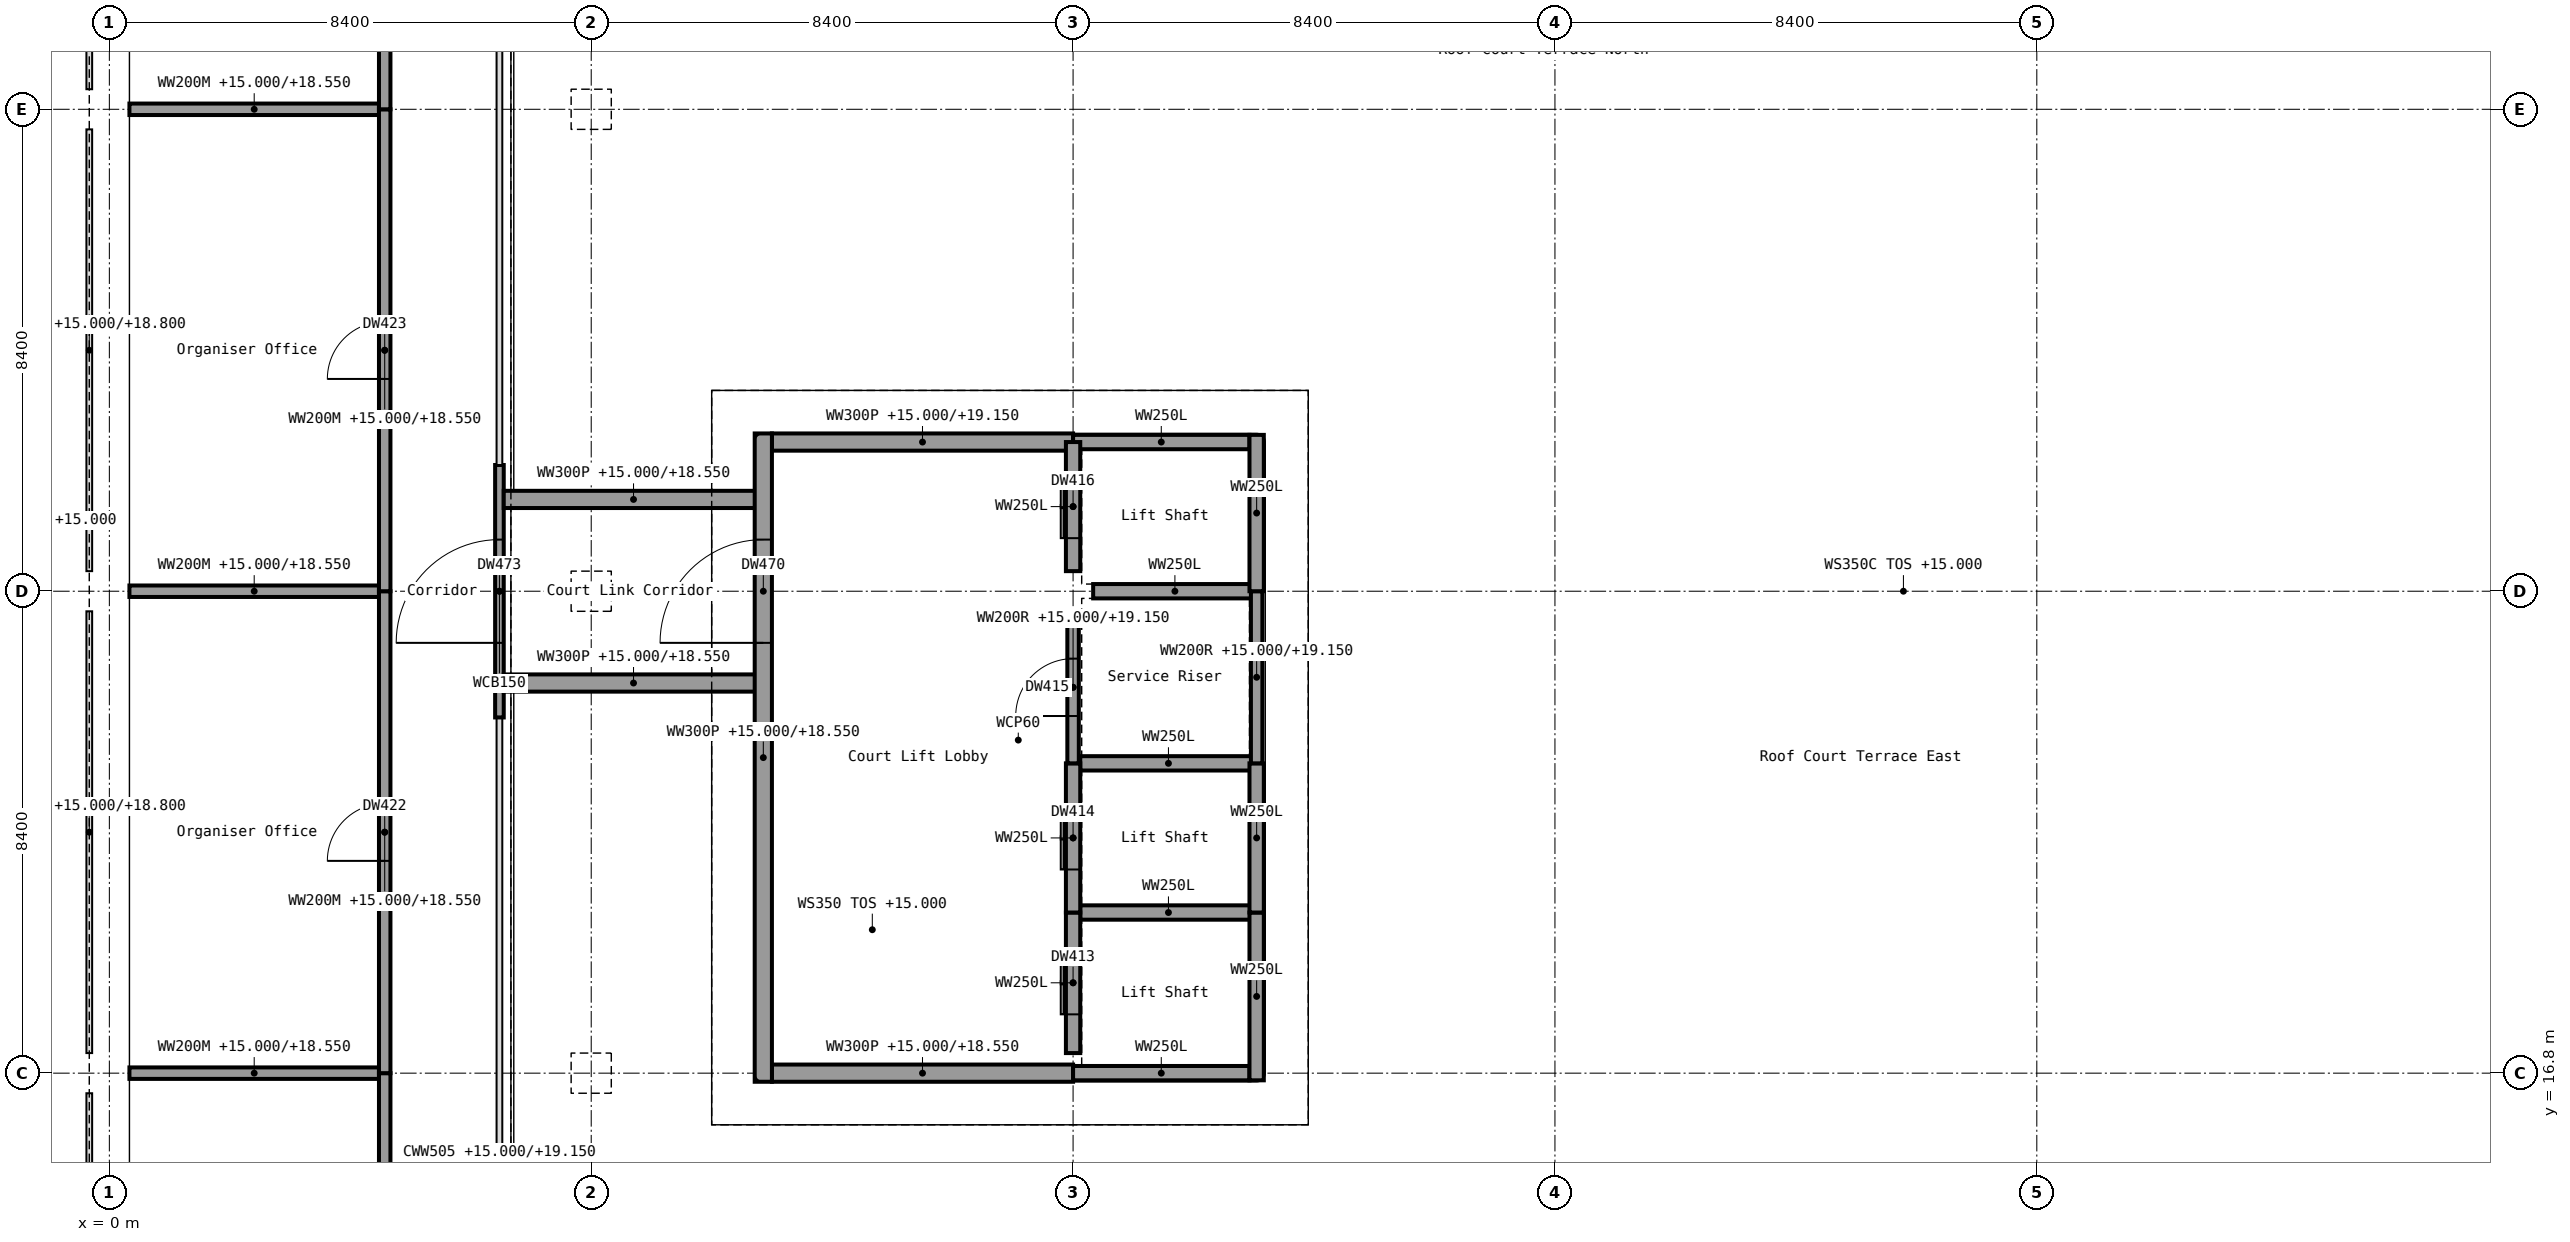
"""IFC4 building model, lengths in metres.
Left out: names, types, materials, properties, quantities, classifications, styles, units other than length and angle.
Written with IfcOpenShell. Run it as: python <this file> out.ifc"""

import sys

from ifc_helpers import new_model, si_unit, direction, frame, frame_2d, origin, origin_2d, place, context, subcontext, project, spatial, rectangle, extrude, element, fill, save


model = new_model("IFC4")
c1 = context("Model", 3, precision=1e-05, world=origin(), true_north=direction((0.0, 1.0)))
c2 = subcontext(c1, "Body", "Model", "MODEL_VIEW")
j1 = project(units=[si_unit("LENGTHUNIT", "METRE"), si_unit("PLANEANGLEUNIT", "RADIAN")], contexts=[c1])
p1 = place(None, origin())
s1 = spatial("IfcSite", under=j1, at=p1, CompositionType="ELEMENT")
p2 = place(p1, origin())
s2 = spatial("IfcBuilding", under=s1, at=p2, CompositionType="ELEMENT")
p3 = place(p2, frame((0.0, 0.0, 15.0)))
s3 = spatial("IfcBuildingStorey", under=s2, at=p3, CompositionType="ELEMENT", Elevation=15.0)
for number, where, z_axis, x_axis in (
    (1, (0.0, 16.8, 0.0), (0.0, 0.0, 1.0), (1.0, 0.0, 0.0)),
    (2, (0.0, 25.2, 0.0), (0.0, 0.0, 1.0), (1.0, 0.0, 0.0)),
    (3, (0.0, 33.6, 0.0), (0.0, 0.0, 1.0), (1.0, 0.0, 0.0)),
    (4, (8.4, 16.8, 0.0), (0.0, 0.0, 1.0), (1.0, 0.0, 0.0)),
    (5, (8.4, 25.2, 0.0), (0.0, 0.0, 1.0), (1.0, 0.0, 0.0)),
    (6, (8.4, 33.6, 0.0), (0.0, 0.0, 1.0), (1.0, 0.0, 0.0)),
):
    element("IfcColumn", number, at=place(p3, frame(where, z_axis=z_axis, x_axis=x_axis)), inside=s3, PredefinedType="COLUMN", context=c2, shape_type="SweptSolid", body=[
        extrude(rectangle(XDim=0.7, YDim=0.7, at=origin_2d()), origin(), (0.0, 0.0, 1.0), 4.5),
    ])
p4 = place(p3, frame((6.8, 23.0, 0.0), z_axis=(0.0, 0.0, 1.0), x_axis=(0.0, 1.0, 0.0)))
e7 = element("IfcWall", 7, at=p4, inside=s3, PredefinedType="SOLIDWALL", context=c2, shape_type="SweptSolid", body=[
    extrude(rectangle(XDim=4.4, YDim=0.15, at=frame_2d((2.2, 0.0))), origin(), (0.0, 0.0, 1.0), 4.15),
])
p5 = place(p4, frame((1.3, 0.0, 0.0)))
e8 = element("IfcOpeningElement", 8, at=p5, cuts=e7, PredefinedType="OPENING", context=c2, shape_type="SweptSolid", body=[
    extrude(rectangle(XDim=1.8, YDim=2.4, at=frame_2d((0.9, 1.2))), frame((0.0, 0.075, 0.0), z_axis=(0.0, -1.0, 0.0), x_axis=(1.0, 0.0, 0.0)), (0.0, 0.0, 1.0), 0.15),
])
p6 = place(p3, frame((0.35, 16.8, 0.0), z_axis=(0.0, 0.0, 1.0), x_axis=(1.0, 0.0, 0.0)))
e9 = element("IfcWall", 9, at=p6, inside=s3, PredefinedType="PARTITIONING", context=c2, shape_type="SweptSolid", body=[
    extrude(rectangle(XDim=4.35, YDim=0.2, at=frame_2d((2.175, 0.0))), origin(), (0.0, 0.0, 1.0), 3.55),
])
p7 = place(p3, frame((11.55, 16.8, 0.0), z_axis=(0.0, 0.0, 1.0), x_axis=(1.0, 0.0, 0.0)))
e10 = element("IfcWall", 10, at=p7, inside=s3, PredefinedType="SOLIDWALL", context=c2, shape_type="SweptSolid", body=[
    extrude(rectangle(XDim=5.25, YDim=0.3, at=frame_2d((2.625, 0.0))), origin(), (0.0, 0.0, 1.0), 3.55),
])
for number, where, z_axis, x_axis in (
    (11, (16.8, 16.8, 0.0), (0.0, 0.0, 1.0), (1.0, 0.0, 0.0)),
    (12, (16.925, 19.6, 0.0), (0.0, 0.0, 1.0), (1.0, 0.0, 0.0)),
    (13, (16.925, 22.2, 0.0), (0.0, 0.0, 1.0), (1.0, 0.0, 0.0)),
):
    element("IfcWall", number, at=place(p3, frame(where, z_axis=z_axis, x_axis=x_axis)), inside=s3, PredefinedType="SHEAR", context=c2, shape_type="SweptSolid", body=[
        extrude(rectangle(XDim=3.075, YDim=0.25, at=frame_2d((1.538, 0.0))), origin(), (0.0, 0.0, 1.0), 4.15),
    ])
p8 = place(p3, frame((6.875, 23.6, 0.0), z_axis=(0.0, 0.0, 1.0), x_axis=(1.0, 0.0, 0.0)))
e14 = element("IfcWall", 14, at=p8, inside=s3, PredefinedType="SOLIDWALL", context=c2, shape_type="SweptSolid", body=[
    extrude(rectangle(XDim=4.525, YDim=0.3, at=frame_2d((2.262, 0.0))), origin(), (0.0, 0.0, 1.0), 3.55),
])
p9 = place(p3, frame((0.35, 25.2, 0.0), z_axis=(0.0, 0.0, 1.0), x_axis=(1.0, 0.0, 0.0)))
e15 = element("IfcWall", 15, at=p9, inside=s3, PredefinedType="PARTITIONING", context=c2, shape_type="SweptSolid", body=[
    extrude(rectangle(XDim=4.35, YDim=0.2, at=frame_2d((2.175, 0.0))), origin(), (0.0, 0.0, 1.0), 3.55),
])
p10 = place(p3, frame((17.15, 25.2, 0.0), z_axis=(0.0, 0.0, 1.0), x_axis=(1.0, 0.0, 0.0)))
e16 = element("IfcWall", 16, at=p10, inside=s3, PredefinedType="SHEAR", context=c2, shape_type="SweptSolid", body=[
    extrude(rectangle(XDim=2.85, YDim=0.25, at=frame_2d((1.425, 0.0))), origin(), (0.0, 0.0, 1.0), 4.15),
])
p11 = place(p3, frame((6.875, 26.8, 0.0), z_axis=(0.0, 0.0, 1.0), x_axis=(1.0, 0.0, 0.0)))
e17 = element("IfcWall", 17, at=p11, inside=s3, PredefinedType="SOLIDWALL", context=c2, shape_type="SweptSolid", body=[
    extrude(rectangle(XDim=4.525, YDim=0.3, at=frame_2d((2.262, 0.0))), origin(), (0.0, 0.0, 1.0), 3.55),
])
p12 = place(p3, frame((11.55, 27.8, 0.0), z_axis=(0.0, 0.0, 1.0), x_axis=(1.0, 0.0, 0.0)))
e18 = element("IfcWall", 18, at=p12, inside=s3, PredefinedType="SOLIDWALL", context=c2, shape_type="SweptSolid", body=[
    extrude(rectangle(XDim=5.25, YDim=0.3, at=frame_2d((2.625, 0.0))), origin(), (0.0, 0.0, 1.0), 4.15),
])
p13 = place(p3, frame((16.8, 27.8, 0.0), z_axis=(0.0, 0.0, 1.0), x_axis=(1.0, 0.0, 0.0)))
e19 = element("IfcWall", 19, at=p13, inside=s3, PredefinedType="SHEAR", context=c2, shape_type="SweptSolid", body=[
    extrude(rectangle(XDim=3.075, YDim=0.25, at=frame_2d((1.538, 0.0))), origin(), (0.0, 0.0, 1.0), 4.15),
])
p14 = place(p3, frame((0.35, 33.6, 0.0), z_axis=(0.0, 0.0, 1.0), x_axis=(1.0, 0.0, 0.0)))
e20 = element("IfcWall", 20, at=p14, inside=s3, PredefinedType="PARTITIONING", context=c2, shape_type="SweptSolid", body=[
    extrude(rectangle(XDim=4.35, YDim=0.2, at=frame_2d((2.175, 0.0))), origin(), (0.0, 0.0, 1.0), 3.55),
])
p15 = place(p3, frame((4.8, 8.525, 0.0), z_axis=(0.0, 0.0, 1.0), x_axis=(0.0, 1.0, 0.0)))
e21 = element("IfcWall", 21, at=p15, inside=s3, PredefinedType="PARTITIONING", context=c2, shape_type="SweptSolid", body=[
    extrude(rectangle(XDim=8.275, YDim=0.2, at=frame_2d((4.138, 0.0))), origin(), (0.0, 0.0, 1.0), 3.55),
])
p16 = place(p15, frame((3.637, 0.0, 0.0)))
e22 = element("IfcOpeningElement", 22, at=p16, cuts=e21, PredefinedType="OPENING", context=c2, shape_type="SweptSolid", body=[
    extrude(rectangle(XDim=1.0, YDim=2.1, at=frame_2d((0.5, 1.05))), frame((0.0, 0.1, 0.0), z_axis=(0.0, -1.0, 0.0), x_axis=(1.0, 0.0, 0.0)), (0.0, 0.0, 1.0), 0.2),
])
p17 = place(p3, frame((4.8, 16.8, 0.0), z_axis=(0.0, 0.0, 1.0), x_axis=(0.0, 1.0, 0.0)))
e23 = element("IfcWall", 23, at=p17, inside=s3, PredefinedType="PARTITIONING", context=c2, shape_type="SweptSolid", body=[
    extrude(rectangle(XDim=8.4, YDim=0.2, at=frame_2d((4.2, 0.0))), origin(), (0.0, 0.0, 1.0), 3.55),
])
p18 = place(p17, frame((3.7, 0.0, 0.0)))
e24 = element("IfcOpeningElement", 24, at=p18, cuts=e23, PredefinedType="OPENING", context=c2, shape_type="SweptSolid", body=[
    extrude(rectangle(XDim=1.0, YDim=2.1, at=frame_2d((0.5, 1.05))), frame((0.0, 0.1, 0.0), z_axis=(0.0, -1.0, 0.0), x_axis=(1.0, 0.0, 0.0)), (0.0, 0.0, 1.0), 0.2),
])
p19 = place(p3, frame((4.8, 25.2, 0.0), z_axis=(0.0, 0.0, 1.0), x_axis=(0.0, 1.0, 0.0)))
e25 = element("IfcWall", 25, at=p19, inside=s3, PredefinedType="PARTITIONING", context=c2, shape_type="SweptSolid", body=[
    extrude(rectangle(XDim=8.4, YDim=0.2, at=frame_2d((4.2, 0.0))), origin(), (0.0, 0.0, 1.0), 3.55),
])
p20 = place(p19, frame((3.7, 0.0, 0.0)))
e26 = element("IfcOpeningElement", 26, at=p20, cuts=e25, PredefinedType="OPENING", context=c2, shape_type="SweptSolid", body=[
    extrude(rectangle(XDim=1.0, YDim=2.1, at=frame_2d((0.5, 1.05))), frame((0.0, 0.1, 0.0), z_axis=(0.0, -1.0, 0.0), x_axis=(1.0, 0.0, 0.0)), (0.0, 0.0, 1.0), 0.2),
])
p21 = place(p3, frame((4.8, 33.6, 0.0), z_axis=(0.0, 0.0, 1.0), x_axis=(0.0, 1.0, 0.0)))
e27 = element("IfcWall", 27, at=p21, inside=s3, PredefinedType="PARTITIONING", context=c2, shape_type="SweptSolid", body=[
    extrude(rectangle(XDim=8.275, YDim=0.2, at=frame_2d((4.137, 0.0))), origin(), (0.0, 0.0, 1.0), 3.55),
])
p22 = place(p21, frame((3.637, 0.0, 0.0)))
e28 = element("IfcOpeningElement", 28, at=p22, cuts=e27, PredefinedType="OPENING", context=c2, shape_type="SweptSolid", body=[
    extrude(rectangle(XDim=1.0, YDim=2.1, at=frame_2d((0.5, 1.05))), frame((0.0, 0.1, 0.0), z_axis=(0.0, -1.0, 0.0), x_axis=(1.0, 0.0, 0.0)), (0.0, 0.0, 1.0), 0.2),
])
p23 = place(p3, frame((11.4, 16.65, 0.0), z_axis=(0.0, 0.0, 1.0), x_axis=(0.0, 1.0, 0.0)))
e29 = element("IfcWall", 29, at=p23, inside=s3, PredefinedType="SOLIDWALL", context=c2, shape_type="SweptSolid", body=[
    extrude(rectangle(XDim=11.3, YDim=0.3, at=frame_2d((5.65, 0.0))), origin(), (0.0, 0.0, 1.0), 3.55),
])
p24 = place(p23, frame((7.65, 0.0, 0.0)))
e30 = element("IfcOpeningElement", 30, at=p24, cuts=e29, PredefinedType="OPENING", context=c2, shape_type="SweptSolid", body=[
    extrude(rectangle(XDim=1.8, YDim=2.4, at=frame_2d((0.9, 1.2))), frame((0.0, 0.15, 0.0), z_axis=(0.0, -1.0, 0.0), x_axis=(1.0, 0.0, 0.0)), (0.0, 0.0, 1.0), 0.3),
])
p25 = place(p3, frame((16.8, 17.15, 0.0), z_axis=(0.0, 0.0, 1.0), x_axis=(0.0, 1.0, 0.0)))
e31 = element("IfcWall", 31, at=p25, inside=s3, PredefinedType="SHEAR", context=c2, shape_type="SweptSolid", body=[
    extrude(rectangle(XDim=2.45, YDim=0.25, at=frame_2d((1.225, 0.0))), origin(), (0.0, 0.0, 1.0), 4.15),
])
p26 = place(p25, frame((0.675, 0.0, 0.0)))
e32 = element("IfcOpeningElement", 32, at=p26, cuts=e31, PredefinedType="OPENING", context=c2, shape_type="SweptSolid", body=[
    extrude(rectangle(XDim=1.1, YDim=2.1, at=frame_2d((0.55, 1.05))), frame((0.0, 0.125, 0.0), z_axis=(0.0, -1.0, 0.0), x_axis=(1.0, 0.0, 0.0)), (0.0, 0.0, 1.0), 0.25),
])
p27 = place(p3, frame((16.8, 19.6, 0.0), z_axis=(0.0, 0.0, 1.0), x_axis=(0.0, 1.0, 0.0)))
e33 = element("IfcWall", 33, at=p27, inside=s3, PredefinedType="SHEAR", context=c2, shape_type="SweptSolid", body=[
    extrude(rectangle(XDim=2.6, YDim=0.25, at=frame_2d((1.3, 0.0))), origin(), (0.0, 0.0, 1.0), 4.15),
])
p28 = place(p27, frame((0.75, 0.0, 0.0)))
e34 = element("IfcOpeningElement", 34, at=p28, cuts=e33, PredefinedType="OPENING", context=c2, shape_type="SweptSolid", body=[
    extrude(rectangle(XDim=1.1, YDim=2.1, at=frame_2d((0.55, 1.05))), frame((0.0, 0.125, 0.0), z_axis=(0.0, -1.0, 0.0), x_axis=(1.0, 0.0, 0.0)), (0.0, 0.0, 1.0), 0.25),
])
p29 = place(p3, frame((16.8, 22.2, 0.0), z_axis=(0.0, 0.0, 1.0), x_axis=(0.0, 1.0, 0.0)))
e35 = element("IfcWall", 35, at=p29, inside=s3, PredefinedType="SOLIDWALL", context=c2, shape_type="SweptSolid", body=[
    extrude(rectangle(XDim=2.65, YDim=0.2, at=frame_2d((1.325, 0.0))), origin(), (0.0, 0.0, 1.0), 4.15),
])
p30 = place(p29, frame((0.825, 0.0, 0.0)))
e36 = element("IfcOpeningElement", 36, at=p30, cuts=e35, PredefinedType="OPENING", context=c2, shape_type="SweptSolid", body=[
    extrude(rectangle(XDim=1.0, YDim=2.1, at=frame_2d((0.5, 1.05))), frame((0.0, 0.1, 0.0), z_axis=(0.0, -1.0, 0.0), x_axis=(1.0, 0.0, 0.0)), (0.0, 0.0, 1.0), 0.2),
])
p31 = place(p3, frame((16.8, 25.55, 0.0), z_axis=(0.0, 0.0, 1.0), x_axis=(0.0, 1.0, 0.0)))
e37 = element("IfcWall", 37, at=p31, inside=s3, PredefinedType="SHEAR", context=c2, shape_type="SweptSolid", body=[
    extrude(rectangle(XDim=2.25, YDim=0.25, at=frame_2d((1.125, 0.0))), origin(), (0.0, 0.0, 1.0), 4.15),
])
p32 = place(p31, frame((0.575, 0.0, 0.0)))
e38 = element("IfcOpeningElement", 38, at=p32, cuts=e37, PredefinedType="OPENING", context=c2, shape_type="SweptSolid", body=[
    extrude(rectangle(XDim=1.1, YDim=2.1, at=frame_2d((0.55, 1.05))), frame((0.0, 0.125, 0.0), z_axis=(0.0, -1.0, 0.0), x_axis=(1.0, 0.0, 0.0)), (0.0, 0.0, 1.0), 0.25),
])
p33 = place(p3, frame((20.0, 16.675, 0.0), z_axis=(0.0, 0.0, 1.0), x_axis=(0.0, 1.0, 0.0)))
e39 = element("IfcWall", 39, at=p33, inside=s3, PredefinedType="SHEAR", context=c2, shape_type="SweptSolid", body=[
    extrude(rectangle(XDim=2.925, YDim=0.25, at=frame_2d((1.462, 0.0))), origin(), (0.0, 0.0, 1.0), 4.15),
])
p34 = place(p3, frame((20.0, 19.6, 0.0), z_axis=(0.0, 0.0, 1.0), x_axis=(0.0, 1.0, 0.0)))
e40 = element("IfcWall", 40, at=p34, inside=s3, PredefinedType="SHEAR", context=c2, shape_type="SweptSolid", body=[
    extrude(rectangle(XDim=2.6, YDim=0.25, at=frame_2d((1.3, 0.0))), origin(), (0.0, 0.0, 1.0), 4.15),
])
p35 = place(p3, frame((20.0, 22.2, 0.0), z_axis=(0.0, 0.0, 1.0), x_axis=(0.0, 1.0, 0.0)))
e41 = element("IfcWall", 41, at=p35, inside=s3, PredefinedType="SOLIDWALL", context=c2, shape_type="SweptSolid", body=[
    extrude(rectangle(XDim=3.0, YDim=0.2, at=frame_2d((1.5, 0.0))), origin(), (0.0, 0.0, 1.0), 4.15),
])
p36 = place(p3, frame((20.0, 25.2, 0.0), z_axis=(0.0, 0.0, 1.0), x_axis=(0.0, 1.0, 0.0)))
e42 = element("IfcWall", 42, at=p36, inside=s3, PredefinedType="SHEAR", context=c2, shape_type="SweptSolid", body=[
    extrude(rectangle(XDim=2.725, YDim=0.25, at=frame_2d((1.363, 0.0))), origin(), (0.0, 0.0, 1.0), 4.15),
])
p37 = place(p5, origin())
e43 = element("IfcDoor", 43, at=p37, inside=s3, OperationType="DOUBLE_DOOR_DOUBLE_SWING", PredefinedType="DOOR", context=c2, shape_type="SweptSolid", body=[
    extrude(rectangle(XDim=1.8, YDim=2.4, at=frame_2d((0.9, 1.2))), frame((0.0, 0.025, 0.0), z_axis=(0.0, -1.0, 0.0), x_axis=(1.0, 0.0, 0.0)), (0.0, 0.0, 1.0), 0.05),
])
fill(e8, e43)
p38 = place(p26, origin())
e44 = element("IfcDoor", 44, at=p38, inside=s3, OperationType="DOUBLE_DOOR_SLIDING", PredefinedType="DOOR", context=c2, shape_type="SweptSolid", body=[
    extrude(rectangle(XDim=1.1, YDim=2.1, at=frame_2d((0.55, 1.05))), frame((0.0, 0.025, 0.0), z_axis=(0.0, -1.0, 0.0), x_axis=(1.0, 0.0, 0.0)), (0.0, 0.0, 1.0), 0.05),
])
fill(e32, e44)
p39 = place(p28, origin())
e45 = element("IfcDoor", 45, at=p39, inside=s3, OperationType="DOUBLE_DOOR_SLIDING", PredefinedType="DOOR", context=c2, shape_type="SweptSolid", body=[
    extrude(rectangle(XDim=1.1, YDim=2.1, at=frame_2d((0.55, 1.05))), frame((0.0, 0.025, 0.0), z_axis=(0.0, -1.0, 0.0), x_axis=(1.0, 0.0, 0.0)), (0.0, 0.0, 1.0), 0.05),
])
fill(e34, e45)
p40 = place(p30, origin())
e46 = element("IfcDoor", 46, at=p40, inside=s3, OperationType="SINGLE_SWING_LEFT", PredefinedType="DOOR", context=c2, shape_type="SweptSolid", body=[
    extrude(rectangle(XDim=1.0, YDim=2.1, at=frame_2d((0.5, 1.05))), frame((0.0, 0.025, 0.0), z_axis=(0.0, -1.0, 0.0), x_axis=(1.0, 0.0, 0.0)), (0.0, 0.0, 1.0), 0.05),
])
fill(e36, e46)
p41 = place(p32, origin())
e47 = element("IfcDoor", 47, at=p41, inside=s3, OperationType="DOUBLE_DOOR_SLIDING", PredefinedType="DOOR", context=c2, shape_type="SweptSolid", body=[
    extrude(rectangle(XDim=1.1, YDim=2.1, at=frame_2d((0.55, 1.05))), frame((0.0, 0.025, 0.0), z_axis=(0.0, -1.0, 0.0), x_axis=(1.0, 0.0, 0.0)), (0.0, 0.0, 1.0), 0.05),
])
fill(e38, e47)
p42 = place(p18, origin())
e48 = element("IfcDoor", 48, at=p42, inside=s3, OperationType="SINGLE_SWING_LEFT", PredefinedType="DOOR", context=c2, shape_type="SweptSolid", body=[
    extrude(rectangle(XDim=1.0, YDim=2.1, at=frame_2d((0.5, 1.05))), frame((0.0, 0.025, 0.0), z_axis=(0.0, -1.0, 0.0), x_axis=(1.0, 0.0, 0.0)), (0.0, 0.0, 1.0), 0.05),
])
fill(e24, e48)
p43 = place(p20, origin())
e49 = element("IfcDoor", 49, at=p43, inside=s3, OperationType="SINGLE_SWING_LEFT", PredefinedType="DOOR", context=c2, shape_type="SweptSolid", body=[
    extrude(rectangle(XDim=1.0, YDim=2.1, at=frame_2d((0.5, 1.05))), frame((0.0, 0.025, 0.0), z_axis=(0.0, -1.0, 0.0), x_axis=(1.0, 0.0, 0.0)), (0.0, 0.0, 1.0), 0.05),
])
fill(e26, e49)
p44 = place(p24, origin())
e50 = element("IfcDoor", 50, at=p44, inside=s3, OperationType="DOUBLE_DOOR_DOUBLE_SWING", PredefinedType="DOOR", context=c2, shape_type="SweptSolid", body=[
    extrude(rectangle(XDim=1.8, YDim=2.4, at=frame_2d((0.9, 1.2))), frame((0.0, 0.025, 0.0), z_axis=(0.0, -1.0, 0.0), x_axis=(1.0, 0.0, 0.0)), (0.0, 0.0, 1.0), 0.05),
])
fill(e30, e50)
save(model, sys.argv[1])
